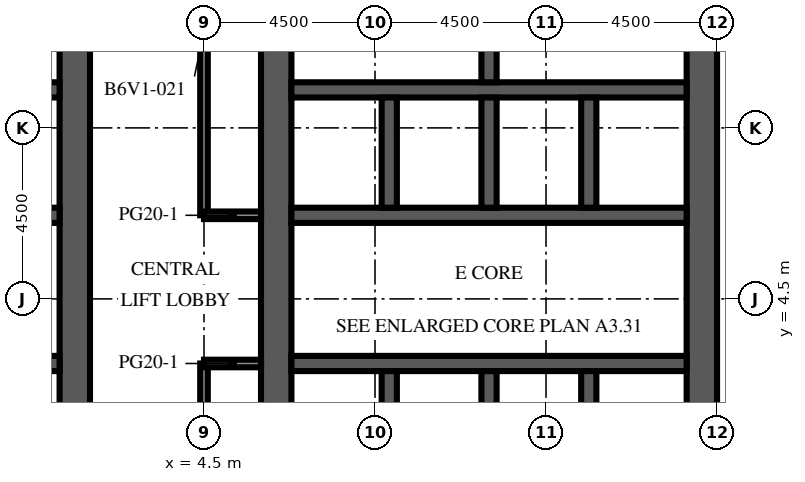
"""IFC4 building model, lengths in metres.
Left out: names, types, materials, properties, quantities, classifications, styles, units other than length and angle.
Written with IfcOpenShell. Run it as: python <this file> out.ifc"""

import sys

from ifc_helpers import new_model, si_unit, direction, frame, frame_2d, origin, place, context, subcontext, project, spatial, rectangle, extrude, element, fill, save


model = new_model("IFC4")
c1 = context("Model", 3, precision=1e-05, world=origin(), true_north=direction((0.0, 1.0)))
c2 = subcontext(c1, "Body", "Model", "MODEL_VIEW")
j1 = project(units=[si_unit("LENGTHUNIT", "METRE"), si_unit("PLANEANGLEUNIT", "RADIAN")], contexts=[c1])
p1 = place(None, origin())
s1 = spatial("IfcSite", under=j1, at=p1, CompositionType="ELEMENT")
p2 = place(p1, origin())
s2 = spatial("IfcBuilding", under=s1, at=p2, CompositionType="ELEMENT")
p3 = place(p2, frame((0.0, 0.0, 207.9)))
s3 = spatial("IfcBuildingStorey", under=s2, at=p3, CompositionType="ELEMENT", Elevation=207.9)
p4 = place(p3, frame((1.1, -9.0, 0.0), z_axis=(0.0, 0.0, 1.0), x_axis=(0.0, 1.0, 0.0)))
e1 = element("IfcWall", 1, at=p4, inside=s3, PredefinedType="SHEAR", context=c2, shape_type="SweptSolid", body=[
    extrude(rectangle(XDim=27.5, YDim=0.8, at=frame_2d((13.75, 0.0))), origin(), (0.0, 0.0, 1.0), 4.1),
])
p5 = place(p4, frame((12.55, 0.0, 0.0)))
e2 = element("IfcOpeningElement", 2, at=p5, cuts=e1, PredefinedType="OPENING", context=c2, shape_type="SweptSolid", body=[
    extrude(rectangle(XDim=2.4, YDim=2.4, at=frame_2d((1.2, 1.2))), frame((0.0, 0.41, 0.0), z_axis=(0.0, -1.0, 0.0), x_axis=(1.0, 0.0, 0.0)), (0.0, 0.0, 1.0), 0.82),
])
p6 = place(p4, frame((3.95, 0.0, 0.0)))
e3 = element("IfcOpeningElement", 3, at=p6, cuts=e1, PredefinedType="OPENING", context=c2, shape_type="SweptSolid", body=[
    extrude(rectangle(XDim=1.2, YDim=2.1, at=frame_2d((0.6, 1.05))), frame((0.0, 0.41, 0.0), z_axis=(0.0, -1.0, 0.0), x_axis=(1.0, 0.0, 0.0)), (0.0, 0.0, 1.0), 0.82),
])
p7 = place(p4, frame((22.35, 0.0, 0.0)))
e4 = element("IfcOpeningElement", 4, at=p7, cuts=e1, PredefinedType="OPENING", context=c2, shape_type="SweptSolid", body=[
    extrude(rectangle(XDim=1.2, YDim=2.1, at=frame_2d((0.6, 1.05))), frame((0.0, 0.41, 0.0), z_axis=(0.0, -1.0, 0.0), x_axis=(1.0, 0.0, 0.0)), (0.0, 0.0, 1.0), 0.82),
])
p8 = place(p3, frame((-9.7, 2.8, 0.0), z_axis=(0.0, 0.0, 1.0), x_axis=(1.0, 0.0, 0.0)))
e5 = element("IfcWall", 5, at=p8, inside=s3, PredefinedType="SHEAR", context=c2, shape_type="SweptSolid", body=[
    extrude(rectangle(XDim=10.4, YDim=0.4, at=frame_2d((5.2, 0.0))), origin(), (0.0, 0.0, 1.0), 4.1),
])
p9 = place(p8, frame((0.738, 0.0, 0.0)))
e6 = element("IfcOpeningElement", 6, at=p9, cuts=e5, PredefinedType="OPENING", context=c2, shape_type="SweptSolid", body=[
    extrude(rectangle(XDim=1.1, YDim=2.1, at=frame_2d((0.55, 1.05))), frame((0.0, 0.21, 0.0), z_axis=(0.0, -1.0, 0.0), x_axis=(1.0, 0.0, 0.0)), (0.0, 0.0, 1.0), 0.42),
])
p10 = place(p8, frame((3.337, 0.0, 0.0)))
e7 = element("IfcOpeningElement", 7, at=p10, cuts=e5, PredefinedType="OPENING", context=c2, shape_type="SweptSolid", body=[
    extrude(rectangle(XDim=1.1, YDim=2.1, at=frame_2d((0.55, 1.05))), frame((0.0, 0.21, 0.0), z_axis=(0.0, -1.0, 0.0), x_axis=(1.0, 0.0, 0.0)), (0.0, 0.0, 1.0), 0.42),
])
p11 = place(p8, frame((6.012, 0.0, 0.0)))
e8 = element("IfcOpeningElement", 8, at=p11, cuts=e5, PredefinedType="OPENING", context=c2, shape_type="SweptSolid", body=[
    extrude(rectangle(XDim=1.0, YDim=2.1, at=frame_2d((0.5, 1.05))), frame((0.0, 0.21, 0.0), z_axis=(0.0, -1.0, 0.0), x_axis=(1.0, 0.0, 0.0)), (0.0, 0.0, 1.0), 0.42),
])
p12 = place(p8, frame((8.613, 0.0, 0.0)))
e9 = element("IfcOpeningElement", 9, at=p12, cuts=e5, PredefinedType="OPENING", context=c2, shape_type="SweptSolid", body=[
    extrude(rectangle(XDim=1.0, YDim=2.1, at=frame_2d((0.5, 1.05))), frame((0.0, 0.21, 0.0), z_axis=(0.0, -1.0, 0.0), x_axis=(1.0, 0.0, 0.0)), (0.0, 0.0, 1.0), 0.42),
])
p13 = place(p3, frame((-9.7, 6.7, 0.0), z_axis=(0.0, 0.0, 1.0), x_axis=(1.0, 0.0, 0.0)))
e10 = element("IfcWall", 10, at=p13, inside=s3, PredefinedType="SHEAR", context=c2, shape_type="SweptSolid", body=[
    extrude(rectangle(XDim=10.4, YDim=0.4, at=frame_2d((5.2, 0.0))), origin(), (0.0, 0.0, 1.0), 4.1),
])
p14 = place(p13, frame((3.337, 0.0, 0.0)))
e11 = element("IfcOpeningElement", 11, at=p14, cuts=e10, PredefinedType="OPENING", context=c2, shape_type="SweptSolid", body=[
    extrude(rectangle(XDim=1.1, YDim=2.1, at=frame_2d((0.55, 1.05))), frame((0.0, 0.21, 0.0), z_axis=(0.0, -1.0, 0.0), x_axis=(1.0, 0.0, 0.0)), (0.0, 0.0, 1.0), 0.42),
])
p15 = place(p13, frame((5.962, 0.0, 0.0)))
e12 = element("IfcOpeningElement", 12, at=p15, cuts=e10, PredefinedType="OPENING", context=c2, shape_type="SweptSolid", body=[
    extrude(rectangle(XDim=1.1, YDim=2.1, at=frame_2d((0.55, 1.05))), frame((0.0, 0.21, 0.0), z_axis=(0.0, -1.0, 0.0), x_axis=(1.0, 0.0, 0.0)), (0.0, 0.0, 1.0), 0.42),
])
p16 = place(p13, frame((8.663, 0.0, 0.0)))
e13 = element("IfcOpeningElement", 13, at=p16, cuts=e10, PredefinedType="OPENING", context=c2, shape_type="SweptSolid", body=[
    extrude(rectangle(XDim=1.1, YDim=2.1, at=frame_2d((0.55, 1.05))), frame((0.0, 0.21, 0.0), z_axis=(0.0, -1.0, 0.0), x_axis=(1.0, 0.0, 0.0)), (0.0, 0.0, 1.0), 0.42),
])
p17 = place(p13, frame((0.688, 0.0, 0.0)))
e14 = element("IfcOpeningElement", 14, at=p17, cuts=e10, PredefinedType="OPENING", context=c2, shape_type="SweptSolid", body=[
    extrude(rectangle(XDim=1.0, YDim=2.1, at=frame_2d((0.5, 1.05))), frame((0.0, 0.21, 0.0), z_axis=(0.0, -1.0, 0.0), x_axis=(1.0, 0.0, 0.0)), (0.0, 0.0, 1.0), 0.42),
])
p18 = place(p3, frame((-9.7, 10.0, 0.0), z_axis=(0.0, 0.0, 1.0), x_axis=(1.0, 0.0, 0.0)))
e15 = element("IfcWall", 15, at=p18, inside=s3, PredefinedType="SHEAR", context=c2, shape_type="SweptSolid", body=[
    extrude(rectangle(XDim=10.4, YDim=0.4, at=frame_2d((5.2, 0.0))), origin(), (0.0, 0.0, 1.0), 4.1),
])
p19 = place(p3, frame((6.4, -9.0, 0.0), z_axis=(0.0, 0.0, 1.0), x_axis=(0.0, 1.0, 0.0)))
e16 = element("IfcWall", 16, at=p19, inside=s3, PredefinedType="SHEAR", context=c2, shape_type="SweptSolid", body=[
    extrude(rectangle(XDim=27.5, YDim=0.8, at=frame_2d((13.75, 0.0))), origin(), (0.0, 0.0, 1.0), 4.1),
])
p20 = place(p19, frame((12.55, 0.0, 0.0)))
e17 = element("IfcOpeningElement", 17, at=p20, cuts=e16, PredefinedType="OPENING", context=c2, shape_type="SweptSolid", body=[
    extrude(rectangle(XDim=2.4, YDim=2.4, at=frame_2d((1.2, 1.2))), frame((0.0, 0.41, 0.0), z_axis=(0.0, -1.0, 0.0), x_axis=(1.0, 0.0, 0.0)), (0.0, 0.0, 1.0), 0.82),
])
p21 = place(p19, frame((3.95, 0.0, 0.0)))
e18 = element("IfcOpeningElement", 18, at=p21, cuts=e16, PredefinedType="OPENING", context=c2, shape_type="SweptSolid", body=[
    extrude(rectangle(XDim=1.2, YDim=2.1, at=frame_2d((0.6, 1.05))), frame((0.0, 0.41, 0.0), z_axis=(0.0, -1.0, 0.0), x_axis=(1.0, 0.0, 0.0)), (0.0, 0.0, 1.0), 0.82),
])
p22 = place(p19, frame((22.35, 0.0, 0.0)))
e19 = element("IfcOpeningElement", 19, at=p22, cuts=e16, PredefinedType="OPENING", context=c2, shape_type="SweptSolid", body=[
    extrude(rectangle(XDim=1.2, YDim=2.1, at=frame_2d((0.6, 1.05))), frame((0.0, 0.41, 0.0), z_axis=(0.0, -1.0, 0.0), x_axis=(1.0, 0.0, 0.0)), (0.0, 0.0, 1.0), 0.82),
])
p23 = place(p3, frame((17.6, -9.0, 0.0), z_axis=(0.0, 0.0, 1.0), x_axis=(0.0, 1.0, 0.0)))
e20 = element("IfcWall", 20, at=p23, inside=s3, PredefinedType="SHEAR", context=c2, shape_type="SweptSolid", body=[
    extrude(rectangle(XDim=27.5, YDim=0.8, at=frame_2d((13.75, 0.0))), origin(), (0.0, 0.0, 1.0), 4.1),
])
p24 = place(p23, frame((12.55, 0.0, 0.0)))
e21 = element("IfcOpeningElement", 21, at=p24, cuts=e20, PredefinedType="OPENING", context=c2, shape_type="SweptSolid", body=[
    extrude(rectangle(XDim=2.4, YDim=2.4, at=frame_2d((1.2, 1.2))), frame((0.0, 0.41, 0.0), z_axis=(0.0, -1.0, 0.0), x_axis=(1.0, 0.0, 0.0)), (0.0, 0.0, 1.0), 0.82),
])
p25 = place(p23, frame((6.825, 0.0, 0.0)))
e22 = element("IfcOpeningElement", 22, at=p25, cuts=e20, PredefinedType="OPENING", context=c2, shape_type="SweptSolid", body=[
    extrude(rectangle(XDim=1.2, YDim=2.1, at=frame_2d((0.6, 1.05))), frame((0.0, 0.41, 0.0), z_axis=(0.0, -1.0, 0.0), x_axis=(1.0, 0.0, 0.0)), (0.0, 0.0, 1.0), 0.82),
])
p26 = place(p23, frame((19.475, 0.0, 0.0)))
e23 = element("IfcOpeningElement", 23, at=p26, cuts=e20, PredefinedType="OPENING", context=c2, shape_type="SweptSolid", body=[
    extrude(rectangle(XDim=1.2, YDim=2.1, at=frame_2d((0.6, 1.05))), frame((0.0, 0.41, 0.0), z_axis=(0.0, -1.0, 0.0), x_axis=(1.0, 0.0, 0.0)), (0.0, 0.0, 1.0), 0.82),
])
p27 = place(p3, frame((6.8, 2.8, 0.0), z_axis=(0.0, 0.0, 1.0), x_axis=(1.0, 0.0, 0.0)))
e24 = element("IfcWall", 24, at=p27, inside=s3, PredefinedType="SHEAR", context=c2, shape_type="SweptSolid", body=[
    extrude(rectangle(XDim=10.4, YDim=0.4, at=frame_2d((5.2, 0.0))), origin(), (0.0, 0.0, 1.0), 4.1),
])
p28 = place(p27, frame((0.738, 0.0, 0.0)))
e25 = element("IfcOpeningElement", 25, at=p28, cuts=e24, PredefinedType="OPENING", context=c2, shape_type="SweptSolid", body=[
    extrude(rectangle(XDim=1.1, YDim=2.1, at=frame_2d((0.55, 1.05))), frame((0.0, 0.21, 0.0), z_axis=(0.0, -1.0, 0.0), x_axis=(1.0, 0.0, 0.0)), (0.0, 0.0, 1.0), 0.42),
])
p29 = place(p27, frame((3.337, 0.0, 0.0)))
e26 = element("IfcOpeningElement", 26, at=p29, cuts=e24, PredefinedType="OPENING", context=c2, shape_type="SweptSolid", body=[
    extrude(rectangle(XDim=1.1, YDim=2.1, at=frame_2d((0.55, 1.05))), frame((0.0, 0.21, 0.0), z_axis=(0.0, -1.0, 0.0), x_axis=(1.0, 0.0, 0.0)), (0.0, 0.0, 1.0), 0.42),
])
p30 = place(p27, frame((6.012, 0.0, 0.0)))
e27 = element("IfcOpeningElement", 27, at=p30, cuts=e24, PredefinedType="OPENING", context=c2, shape_type="SweptSolid", body=[
    extrude(rectangle(XDim=1.0, YDim=2.1, at=frame_2d((0.5, 1.05))), frame((0.0, 0.21, 0.0), z_axis=(0.0, -1.0, 0.0), x_axis=(1.0, 0.0, 0.0)), (0.0, 0.0, 1.0), 0.42),
])
p31 = place(p27, frame((8.613, 0.0, 0.0)))
e28 = element("IfcOpeningElement", 28, at=p31, cuts=e24, PredefinedType="OPENING", context=c2, shape_type="SweptSolid", body=[
    extrude(rectangle(XDim=1.0, YDim=2.1, at=frame_2d((0.5, 1.05))), frame((0.0, 0.21, 0.0), z_axis=(0.0, -1.0, 0.0), x_axis=(1.0, 0.0, 0.0)), (0.0, 0.0, 1.0), 0.42),
])
p32 = place(p3, frame((6.8, 6.7, 0.0), z_axis=(0.0, 0.0, 1.0), x_axis=(1.0, 0.0, 0.0)))
e29 = element("IfcWall", 29, at=p32, inside=s3, PredefinedType="SHEAR", context=c2, shape_type="SweptSolid", body=[
    extrude(rectangle(XDim=10.4, YDim=0.4, at=frame_2d((5.2, 0.0))), origin(), (0.0, 0.0, 1.0), 4.1),
])
p33 = place(p32, frame((3.337, 0.0, 0.0)))
e30 = element("IfcOpeningElement", 30, at=p33, cuts=e29, PredefinedType="OPENING", context=c2, shape_type="SweptSolid", body=[
    extrude(rectangle(XDim=1.1, YDim=2.1, at=frame_2d((0.55, 1.05))), frame((0.0, 0.21, 0.0), z_axis=(0.0, -1.0, 0.0), x_axis=(1.0, 0.0, 0.0)), (0.0, 0.0, 1.0), 0.42),
])
p34 = place(p32, frame((5.962, 0.0, 0.0)))
e31 = element("IfcOpeningElement", 31, at=p34, cuts=e29, PredefinedType="OPENING", context=c2, shape_type="SweptSolid", body=[
    extrude(rectangle(XDim=1.1, YDim=2.1, at=frame_2d((0.55, 1.05))), frame((0.0, 0.21, 0.0), z_axis=(0.0, -1.0, 0.0), x_axis=(1.0, 0.0, 0.0)), (0.0, 0.0, 1.0), 0.42),
])
p35 = place(p32, frame((8.663, 0.0, 0.0)))
e32 = element("IfcOpeningElement", 32, at=p35, cuts=e29, PredefinedType="OPENING", context=c2, shape_type="SweptSolid", body=[
    extrude(rectangle(XDim=1.1, YDim=2.1, at=frame_2d((0.55, 1.05))), frame((0.0, 0.21, 0.0), z_axis=(0.0, -1.0, 0.0), x_axis=(1.0, 0.0, 0.0)), (0.0, 0.0, 1.0), 0.42),
])
p36 = place(p32, frame((0.688, 0.0, 0.0)))
e33 = element("IfcOpeningElement", 33, at=p36, cuts=e29, PredefinedType="OPENING", context=c2, shape_type="SweptSolid", body=[
    extrude(rectangle(XDim=1.0, YDim=2.1, at=frame_2d((0.5, 1.05))), frame((0.0, 0.21, 0.0), z_axis=(0.0, -1.0, 0.0), x_axis=(1.0, 0.0, 0.0)), (0.0, 0.0, 1.0), 0.42),
])
p37 = place(p3, frame((6.8, 10.0, 0.0), z_axis=(0.0, 0.0, 1.0), x_axis=(1.0, 0.0, 0.0)))
e34 = element("IfcWall", 34, at=p37, inside=s3, PredefinedType="SHEAR", context=c2, shape_type="SweptSolid", body=[
    extrude(rectangle(XDim=10.4, YDim=0.4, at=frame_2d((5.2, 0.0))), origin(), (0.0, 0.0, 1.0), 4.1),
])
for number, where, z_axis, x_axis in (
    (35, (9.375, -0.3, 0.0), (0.0, 0.0, 1.0), (0.0, 1.0, 0.0)),
    (36, (9.375, 6.9, 0.0), (0.0, 0.0, 1.0), (0.0, 1.0, 0.0)),
    (37, (12.0, -0.3, 0.0), (0.0, 0.0, 1.0), (0.0, 1.0, 0.0)),
    (38, (12.0, 6.9, 0.0), (0.0, 0.0, 1.0), (0.0, 1.0, 0.0)),
    (39, (14.625, -0.3, 0.0), (0.0, 0.0, 1.0), (0.0, 1.0, 0.0)),
    (40, (14.625, 6.9, 0.0), (0.0, 0.0, 1.0), (0.0, 1.0, 0.0)),
):
    element("IfcWall", number, at=place(p3, frame(where, z_axis=z_axis, x_axis=x_axis)), inside=s3, PredefinedType="SHEAR", context=c2, shape_type="SweptSolid", body=[
        extrude(rectangle(XDim=2.9, YDim=0.4, at=frame_2d((1.45, 0.0))), origin(), (0.0, 0.0, 1.0), 4.1),
    ])
p38 = place(p3, frame((12.0, 10.2, 0.0), z_axis=(0.0, 0.0, 1.0), x_axis=(0.0, 1.0, 0.0)))
e41 = element("IfcWall", 41, at=p38, inside=s3, PredefinedType="SHEAR", context=c2, shape_type="SweptSolid", body=[
    extrude(rectangle(XDim=7.5, YDim=0.4, at=frame_2d((3.75, 0.0))), origin(), (0.0, 0.0, 1.0), 4.1),
])
p39 = place(p3, frame((8.2, 10.2, 0.0), z_axis=(0.0, 0.0, 1.0), x_axis=(0.0, 1.0, 0.0)))
e42 = element("IfcWall", 42, at=p39, inside=s3, PredefinedType="PARTITIONING", context=c2, shape_type="SweptSolid", body=[
    extrude(rectangle(XDim=2.25, YDim=0.1, at=frame_2d((1.125, 0.0))), origin(), (0.0, 0.0, 1.0), 3.65),
])
p40 = place(p39, frame((0.625, 0.0, 0.0)))
e43 = element("IfcOpeningElement", 43, at=p40, cuts=e42, PredefinedType="OPENING", context=c2, shape_type="SweptSolid", body=[
    extrude(rectangle(XDim=1.0, YDim=2.1, at=frame_2d((0.5, 1.05))), frame((0.0, 0.06, 0.0), z_axis=(0.0, -1.0, 0.0), x_axis=(1.0, 0.0, 0.0)), (0.0, 0.0, 1.0), 0.12),
])
p41 = place(p3, frame((4.5, 2.8, 0.0), z_axis=(0.0, 0.0, 1.0), x_axis=(0.0, -1.0, 0.0)))
e44 = element("IfcWall", 44, at=p41, inside=s3, PredefinedType="PARTITIONING", context=c2, shape_type="SweptSolid", body=[
    extrude(rectangle(XDim=6.3, YDim=0.2, at=frame_2d((3.15, 0.0))), origin(), (0.0, 0.0, 1.0), 3.65),
])
p42 = place(p41, frame((2.45, 0.0, 0.0)))
e45 = element("IfcOpeningElement", 45, at=p42, cuts=e44, PredefinedType="OPENING", context=c2, shape_type="SweptSolid", body=[
    extrude(rectangle(XDim=1.0, YDim=2.1, at=frame_2d((0.5, 1.05))), frame((0.0, 0.11, 0.0), z_axis=(0.0, -1.0, 0.0), x_axis=(1.0, 0.0, 0.0)), (0.0, 0.0, 1.0), 0.22),
])
p43 = place(p3, frame((4.5, 18.5, 0.0), z_axis=(0.0, 0.0, 1.0), x_axis=(0.0, -1.0, 0.0)))
e46 = element("IfcWall", 46, at=p43, inside=s3, PredefinedType="PARTITIONING", context=c2, shape_type="SweptSolid", body=[
    extrude(rectangle(XDim=11.8, YDim=0.2, at=frame_2d((5.9, 0.0))), origin(), (0.0, 0.0, 1.0), 3.65),
])
p44 = place(p43, frame((6.45, 0.0, 0.0)))
e47 = element("IfcOpeningElement", 47, at=p44, cuts=e46, PredefinedType="OPENING", context=c2, shape_type="SweptSolid", body=[
    extrude(rectangle(XDim=1.0, YDim=2.1, at=frame_2d((0.5, 1.05))), frame((0.0, 0.11, 0.0), z_axis=(0.0, -1.0, 0.0), x_axis=(1.0, 0.0, 0.0)), (0.0, 0.0, 1.0), 0.22),
])
for number, where, z_axis, x_axis in (
    (48, (4.5, 2.8, 0.0), (0.0, 0.0, 1.0), (1.0, 0.0, 0.0)),
    (49, (4.5, 6.7, 0.0), (0.0, 0.0, 1.0), (1.0, 0.0, 0.0)),
):
    element("IfcWall", number, at=place(p3, frame(where, z_axis=z_axis, x_axis=x_axis)), inside=s3, PredefinedType="PARTITIONING", context=c2, shape_type="SweptSolid", body=[
        extrude(rectangle(XDim=1.5, YDim=0.2, at=frame_2d((0.75, 0.0))), origin(), (0.0, 0.0, 1.0), 3.65),
    ])
p45 = place(p28, origin())
e50 = element("IfcDoor", 50, at=p45, inside=s3, OperationType="DOUBLE_DOOR_SLIDING", PredefinedType="DOOR", context=c2, shape_type="SweptSolid", body=[
    extrude(rectangle(XDim=1.1, YDim=2.1, at=frame_2d((0.55, 1.05))), frame((0.0, 0.025, 0.0), z_axis=(0.0, -1.0, 0.0), x_axis=(1.0, 0.0, 0.0)), (0.0, 0.0, 1.0), 0.05),
])
fill(e25, e50)
p46 = place(p29, origin())
e51 = element("IfcDoor", 51, at=p46, inside=s3, OperationType="DOUBLE_DOOR_SLIDING", PredefinedType="DOOR", context=c2, shape_type="SweptSolid", body=[
    extrude(rectangle(XDim=1.1, YDim=2.1, at=frame_2d((0.55, 1.05))), frame((0.0, 0.025, 0.0), z_axis=(0.0, -1.0, 0.0), x_axis=(1.0, 0.0, 0.0)), (0.0, 0.0, 1.0), 0.05),
])
fill(e26, e51)
p47 = place(p33, origin())
e52 = element("IfcDoor", 52, at=p47, inside=s3, OperationType="DOUBLE_DOOR_SLIDING", PredefinedType="DOOR", context=c2, shape_type="SweptSolid", body=[
    extrude(rectangle(XDim=1.1, YDim=2.1, at=frame_2d((0.55, 1.05))), frame((0.0, 0.025, 0.0), z_axis=(0.0, -1.0, 0.0), x_axis=(1.0, 0.0, 0.0)), (0.0, 0.0, 1.0), 0.05),
])
fill(e30, e52)
p48 = place(p34, origin())
e53 = element("IfcDoor", 53, at=p48, inside=s3, OperationType="DOUBLE_DOOR_SLIDING", PredefinedType="DOOR", context=c2, shape_type="SweptSolid", body=[
    extrude(rectangle(XDim=1.1, YDim=2.1, at=frame_2d((0.55, 1.05))), frame((0.0, 0.025, 0.0), z_axis=(0.0, -1.0, 0.0), x_axis=(1.0, 0.0, 0.0)), (0.0, 0.0, 1.0), 0.05),
])
fill(e31, e53)
p49 = place(p35, origin())
e54 = element("IfcDoor", 54, at=p49, inside=s3, OperationType="DOUBLE_DOOR_SLIDING", PredefinedType="DOOR", context=c2, shape_type="SweptSolid", body=[
    extrude(rectangle(XDim=1.1, YDim=2.1, at=frame_2d((0.55, 1.05))), frame((0.0, 0.025, 0.0), z_axis=(0.0, -1.0, 0.0), x_axis=(1.0, 0.0, 0.0)), (0.0, 0.0, 1.0), 0.05),
])
fill(e32, e54)
p50 = place(p5, origin())
e55 = element("IfcDoor", 55, at=p50, inside=s3, OperationType="DOUBLE_DOOR_DOUBLE_SWING", PredefinedType="DOOR", context=c2, shape_type="SweptSolid", body=[
    extrude(rectangle(XDim=2.4, YDim=2.4, at=frame_2d((1.2, 1.2))), frame((0.0, 0.025, 0.0), z_axis=(0.0, -1.0, 0.0), x_axis=(1.0, 0.0, 0.0)), (0.0, 0.0, 1.0), 0.05),
])
fill(e2, e55)
p51 = place(p20, origin())
e56 = element("IfcDoor", 56, at=p51, inside=s3, OperationType="DOUBLE_DOOR_DOUBLE_SWING", PredefinedType="DOOR", context=c2, shape_type="SweptSolid", body=[
    extrude(rectangle(XDim=2.4, YDim=2.4, at=frame_2d((1.2, 1.2))), frame((0.0, 0.025, 0.0), z_axis=(0.0, -1.0, 0.0), x_axis=(1.0, 0.0, 0.0)), (0.0, 0.0, 1.0), 0.05),
])
fill(e17, e56)
p52 = place(p24, origin())
e57 = element("IfcDoor", 57, at=p52, inside=s3, OperationType="DOUBLE_DOOR_DOUBLE_SWING", PredefinedType="DOOR", context=c2, shape_type="SweptSolid", body=[
    extrude(rectangle(XDim=2.4, YDim=2.4, at=frame_2d((1.2, 1.2))), frame((0.0, 0.025, 0.0), z_axis=(0.0, -1.0, 0.0), x_axis=(1.0, 0.0, 0.0)), (0.0, 0.0, 1.0), 0.05),
])
fill(e21, e57)
p53 = place(p26, frame((1.2, 0.0, 0.0), z_axis=(0.0, 0.0, 1.0), x_axis=(-1.0, 0.0, 0.0)))
e58 = element("IfcDoor", 58, at=p53, inside=s3, OperationType="SINGLE_SWING_LEFT", PredefinedType="DOOR", context=c2, shape_type="SweptSolid", body=[
    extrude(rectangle(XDim=1.2, YDim=2.1, at=frame_2d((0.6, 1.05))), frame((0.0, 0.025, 0.0), z_axis=(0.0, -1.0, 0.0), x_axis=(1.0, 0.0, 0.0)), (0.0, 0.0, 1.0), 0.05),
])
fill(e23, e58)
p54 = place(p30, origin())
e59 = element("IfcDoor", 59, at=p54, inside=s3, OperationType="SINGLE_SWING_LEFT", PredefinedType="DOOR", context=c2, shape_type="SweptSolid", body=[
    extrude(rectangle(XDim=1.0, YDim=2.1, at=frame_2d((0.5, 1.05))), frame((0.0, 0.025, 0.0), z_axis=(0.0, -1.0, 0.0), x_axis=(1.0, 0.0, 0.0)), (0.0, 0.0, 1.0), 0.05),
])
fill(e27, e59)
p55 = place(p31, origin())
e60 = element("IfcDoor", 60, at=p55, inside=s3, OperationType="SINGLE_SWING_RIGHT", PredefinedType="DOOR", context=c2, shape_type="SweptSolid", body=[
    extrude(rectangle(XDim=1.0, YDim=2.1, at=frame_2d((0.5, 1.05))), frame((0.0, 0.025, 0.0), z_axis=(0.0, -1.0, 0.0), x_axis=(1.0, 0.0, 0.0)), (0.0, 0.0, 1.0), 0.05),
])
fill(e28, e60)
p56 = place(p36, origin())
e61 = element("IfcDoor", 61, at=p56, inside=s3, OperationType="SINGLE_SWING_LEFT", PredefinedType="DOOR", context=c2, shape_type="SweptSolid", body=[
    extrude(rectangle(XDim=1.0, YDim=2.1, at=frame_2d((0.5, 1.05))), frame((0.0, 0.025, 0.0), z_axis=(0.0, -1.0, 0.0), x_axis=(1.0, 0.0, 0.0)), (0.0, 0.0, 1.0), 0.05),
])
fill(e33, e61)
p57 = place(p40, origin())
e62 = element("IfcDoor", 62, at=p57, inside=s3, OperationType="SINGLE_SWING_LEFT", PredefinedType="DOOR", context=c2, shape_type="SweptSolid", body=[
    extrude(rectangle(XDim=1.0, YDim=2.1, at=frame_2d((0.5, 1.05))), frame((0.0, 0.025, 0.0), z_axis=(0.0, -1.0, 0.0), x_axis=(1.0, 0.0, 0.0)), (0.0, 0.0, 1.0), 0.05),
])
fill(e43, e62)
save(model, sys.argv[1])
